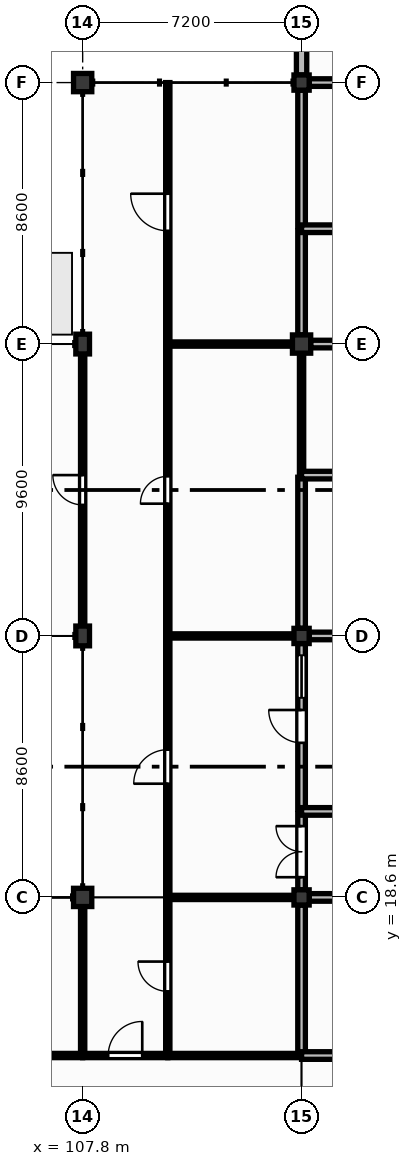
"""IFC4 building model, lengths in metres.
Left out: names, types, materials, properties, quantities, classifications, styles, units other than length and angle.
Written with IfcOpenShell. Run it as: python <this file> out.ifc"""

import sys

from ifc_helpers import new_model, si_unit, direction, frame, frame_2d, origin, origin_2d, place, context, subcontext, project, spatial, rectangle, extrude, element, fill, save


model = new_model("IFC4")
c1 = context("Model", 3, precision=1e-05, world=origin(), true_north=direction((0.0, 1.0)))
c2 = subcontext(c1, "Body", "Model", "MODEL_VIEW")
j1 = project(units=[si_unit("LENGTHUNIT", "METRE"), si_unit("PLANEANGLEUNIT", "RADIAN")], contexts=[c1])
p1 = place(None, origin())
s1 = spatial("IfcSite", under=j1, at=p1, CompositionType="ELEMENT")
p2 = place(p1, origin())
s2 = spatial("IfcBuilding", under=s1, at=p2, CompositionType="ELEMENT")
p3 = place(p2, origin())
s3 = spatial("IfcBuildingStorey", under=s2, at=p3, CompositionType="ELEMENT", Elevation=0.0)
p4 = place(p3, frame((107.8, 18.6, 0.0), z_axis=(0.0, 0.0, 1.0), x_axis=(1.0, 0.0, 0.0)))
e1 = element("IfcColumn", 1, at=p4, inside=s3, PredefinedType="COLUMN", context=c2, shape_type="SweptSolid", body=[
    extrude(rectangle(XDim=0.6, YDim=0.6, at=origin_2d()), origin(), (0.0, 0.0, 1.0), 4.2),
])
for number, where, z_axis, x_axis in (
    (2, (107.8, 27.2, 0.0), (0.0, 0.0, 1.0), (1.0, 0.0, 0.0)),
    (3, (107.8, 36.8, 0.0), (0.0, 0.0, 1.0), (1.0, 0.0, 0.0)),
):
    element("IfcColumn", number, at=place(p3, frame(where, z_axis=z_axis, x_axis=x_axis)), inside=s3, PredefinedType="COLUMN", context=c2, shape_type="SweptSolid", body=[
        extrude(rectangle(XDim=0.45, YDim=0.65, at=origin_2d()), origin(), (0.0, 0.0, 1.0), 4.2),
    ])
p5 = place(p3, frame((107.8, 45.4, 0.0), z_axis=(0.0, 0.0, 1.0), x_axis=(1.0, 0.0, 0.0)))
e4 = element("IfcColumn", 4, at=p5, inside=s3, PredefinedType="COLUMN", context=c2, shape_type="SweptSolid", body=[
    extrude(rectangle(XDim=0.6, YDim=0.6, at=origin_2d()), origin(), (0.0, 0.0, 1.0), 4.2),
])
for number, where, z_axis, x_axis in (
    (5, (115.0, 18.6, 0.0), (0.0, 0.0, 1.0), (1.0, 0.0, 0.0)),
    (6, (115.0, 27.2, 0.0), (0.0, 0.0, 1.0), (1.0, 0.0, 0.0)),
):
    element("IfcColumn", number, at=place(p3, frame(where, z_axis=z_axis, x_axis=x_axis)), inside=s3, PredefinedType="COLUMN", context=c2, shape_type="SweptSolid", body=[
        extrude(rectangle(XDim=0.5, YDim=0.5, at=origin_2d()), origin(), (0.0, 0.0, 1.0), 4.2),
    ])
p6 = place(p3, frame((115.0, 36.8, 0.0), z_axis=(0.0, 0.0, 1.0), x_axis=(1.0, 0.0, 0.0)))
e7 = element("IfcColumn", 7, at=p6, inside=s3, PredefinedType="COLUMN", context=c2, shape_type="SweptSolid", body=[
    extrude(rectangle(XDim=0.6, YDim=0.6, at=origin_2d()), origin(), (0.0, 0.0, 1.0), 4.2),
])
p7 = place(p3, frame((115.0, 45.4, 0.0), z_axis=(0.0, 0.0, 1.0), x_axis=(1.0, 0.0, 0.0)))
e8 = element("IfcColumn", 8, at=p7, inside=s3, PredefinedType="COLUMN", context=c2, shape_type="SweptSolid", body=[
    extrude(rectangle(XDim=0.5, YDim=0.5, at=origin_2d()), origin(), (0.0, 0.0, 1.0), 4.2),
])
p8 = place(p3, frame((115.0, 45.65, 0.0), z_axis=(0.0, 0.0, 1.0), x_axis=(0.0, 1.0, 0.0)))
e9 = element("IfcWall", 9, at=p8, inside=s3, PredefinedType="SOLIDWALL", context=c2, shape_type="SweptSolid", body=[
    extrude(rectangle(XDim=6.7, YDim=0.34, at=frame_2d((3.35, 0.0))), origin(), (0.0, 0.0, 1.0), 3.68),
])
p9 = place(p8, frame((0.881, 0.0, 1.0)))
e10 = element("IfcOpeningElement", 10, at=p9, cuts=e9, PredefinedType="OPENING", context=c2, shape_type="SweptSolid", body=[
    extrude(rectangle(XDim=1.34, YDim=1.95, at=frame_2d((0.67, 0.975))), frame((0.0, 0.18, 0.0), z_axis=(0.0, -1.0, 0.0), x_axis=(1.0, 0.0, 0.0)), (0.0, 0.0, 1.0), 0.36),
])
p10 = place(p8, frame((4.231, 0.0, 1.0)))
e11 = element("IfcOpeningElement", 11, at=p10, cuts=e9, PredefinedType="OPENING", context=c2, shape_type="SweptSolid", body=[
    extrude(rectangle(XDim=1.1, YDim=2.2, at=frame_2d((0.55, 1.1))), frame((0.0, 0.18, 0.0), z_axis=(0.0, -1.0, 0.0), x_axis=(1.0, 0.0, 0.0)), (0.0, 0.0, 1.0), 0.36),
])
p11 = place(p3, frame((100.6, 13.4, 0.0), z_axis=(0.0, 0.0, 1.0), x_axis=(1.0, 0.0, 0.0)))
e12 = element("IfcWall", 12, at=p11, inside=s3, PredefinedType="PARTITIONING", context=c2, shape_type="SweptSolid", body=[
    extrude(rectangle(XDim=7.2, YDim=0.14, at=frame_2d((3.6, 0.0))), origin(), (0.0, 0.0, 1.0), 4.18),
])
p12 = place(p11, frame((2.99, 0.0, 0.0)))
e13 = element("IfcOpeningElement", 13, at=p12, cuts=e12, PredefinedType="OPENING", context=c2, shape_type="SweptSolid", body=[
    extrude(rectangle(XDim=1.22, YDim=2.1, at=frame_2d((0.61, 1.05))), frame((0.0, 0.08, 0.0), z_axis=(0.0, -1.0, 0.0), x_axis=(1.0, 0.0, 0.0)), (0.0, 0.0, 1.0), 0.16),
])
p13 = place(p3, frame((107.8, 13.47, 0.0), z_axis=(0.0, 0.0, 1.0), x_axis=(0.0, 1.0, 0.0)))
e14 = element("IfcWall", 14, at=p13, inside=s3, PredefinedType="PARTITIONING", context=c2, shape_type="SweptSolid", body=[
    extrude(rectangle(XDim=4.83, YDim=0.14, at=frame_2d((2.415, 0.0))), origin(), (0.0, 0.0, 1.0), 3.5),
])
p14 = place(p3, frame((107.8, 13.4, 0.0), z_axis=(0.0, 0.0, 1.0), x_axis=(1.0, 0.0, 0.0)))
e15 = element("IfcWall", 15, at=p14, inside=s3, PredefinedType="PARTITIONING", context=c2, shape_type="SweptSolid", body=[
    extrude(rectangle(XDim=2.8, YDim=0.14, at=frame_2d((1.4, 0.0))), origin(), (0.0, 0.0, 1.0), 4.18),
])
p15 = place(p14, frame((0.84, 0.0, 0.0)))
e16 = element("IfcOpeningElement", 16, at=p15, cuts=e15, PredefinedType="OPENING", context=c2, shape_type="SweptSolid", body=[
    extrude(rectangle(XDim=1.12, YDim=2.15, at=frame_2d((0.56, 1.075))), frame((0.0, 0.08, 0.0), z_axis=(0.0, -1.0, 0.0), x_axis=(1.0, 0.0, 0.0)), (0.0, 0.0, 1.0), 0.16),
])
p16 = place(p3, frame((107.8, 27.525, 0.0), z_axis=(0.0, 0.0, 1.0), x_axis=(0.0, 1.0, 0.0)))
e17 = element("IfcWall", 17, at=p16, inside=s3, PredefinedType="PARTITIONING", context=c2, shape_type="SweptSolid", body=[
    extrude(rectangle(XDim=8.95, YDim=0.14, at=frame_2d((4.475, 0.0))), origin(), (0.0, 0.0, 1.0), 3.4),
])
p17 = place(p16, frame((3.985, 0.0, 0.0)))
e18 = element("IfcOpeningElement", 18, at=p17, cuts=e17, PredefinedType="OPENING", context=c2, shape_type="SweptSolid", body=[
    extrude(rectangle(XDim=0.98, YDim=2.15, at=frame_2d((0.49, 1.075))), frame((0.0, 0.08, 0.0), z_axis=(0.0, -1.0, 0.0), x_axis=(1.0, 0.0, 0.0)), (0.0, 0.0, 1.0), 0.16),
])
p18 = place(p3, frame((110.6, 13.47, 0.0), z_axis=(0.0, 0.0, 1.0), x_axis=(0.0, 1.0, 0.0)))
e19 = element("IfcWall", 19, at=p18, inside=s3, PredefinedType="PARTITIONING", context=c2, shape_type="SweptSolid", body=[
    extrude(rectangle(XDim=5.06, YDim=0.14, at=frame_2d((2.53, 0.0))), origin(), (0.0, 0.0, 1.0), 4.18),
])
p19 = place(p18, frame((2.04, 0.0, 0.0)))
e20 = element("IfcOpeningElement", 20, at=p19, cuts=e19, PredefinedType="OPENING", context=c2, shape_type="SweptSolid", body=[
    extrude(rectangle(XDim=0.98, YDim=2.15, at=frame_2d((0.49, 1.075))), frame((0.0, 0.08, 0.0), z_axis=(0.0, -1.0, 0.0), x_axis=(1.0, 0.0, 0.0)), (0.0, 0.0, 1.0), 0.16),
])
p20 = place(p3, frame((110.6, 13.4, 0.0), z_axis=(0.0, 0.0, 1.0), x_axis=(1.0, 0.0, 0.0)))
e21 = element("IfcWall", 21, at=p20, inside=s3, PredefinedType="PARTITIONING", context=c2, shape_type="SweptSolid", body=[
    extrude(rectangle(XDim=4.4, YDim=0.14, at=frame_2d((2.2, 0.0))), origin(), (0.0, 0.0, 1.0), 4.18),
])
p21 = place(p3, frame((110.6, 18.67, 0.0), z_axis=(0.0, 0.0, 1.0), x_axis=(0.0, 1.0, 0.0)))
e22 = element("IfcWall", 22, at=p21, inside=s3, PredefinedType="PARTITIONING", context=c2, shape_type="SweptSolid", body=[
    extrude(rectangle(XDim=8.46, YDim=0.14, at=frame_2d((4.23, 0.0))), origin(), (0.0, 0.0, 1.0), 4.18),
])
p22 = place(p21, frame((3.67, 0.0, 0.0)))
e23 = element("IfcOpeningElement", 23, at=p22, cuts=e22, PredefinedType="OPENING", context=c2, shape_type="SweptSolid", body=[
    extrude(rectangle(XDim=1.12, YDim=2.15, at=frame_2d((0.56, 1.075))), frame((0.0, 0.08, 0.0), z_axis=(0.0, -1.0, 0.0), x_axis=(1.0, 0.0, 0.0)), (0.0, 0.0, 1.0), 0.16),
])
p23 = place(p3, frame((110.6, 18.6, 0.0), z_axis=(0.0, 0.0, 1.0), x_axis=(1.0, 0.0, 0.0)))
e24 = element("IfcWall", 24, at=p23, inside=s3, PredefinedType="PARTITIONING", context=c2, shape_type="SweptSolid", body=[
    extrude(rectangle(XDim=4.15, YDim=0.14, at=frame_2d((2.075, 0.0))), origin(), (0.0, 0.0, 1.0), 3.25),
])
p24 = place(p3, frame((110.6, 27.27, 0.0), z_axis=(0.0, 0.0, 1.0), x_axis=(0.0, 1.0, 0.0)))
e25 = element("IfcWall", 25, at=p24, inside=s3, PredefinedType="PARTITIONING", context=c2, shape_type="SweptSolid", body=[
    extrude(rectangle(XDim=9.46, YDim=0.14, at=frame_2d((4.73, 0.0))), origin(), (0.0, 0.0, 1.0), 4.18),
])
p25 = place(p24, frame((4.28, 0.0, 0.0)))
e26 = element("IfcOpeningElement", 26, at=p25, cuts=e25, PredefinedType="OPENING", context=c2, shape_type="SweptSolid", body=[
    extrude(rectangle(XDim=0.9, YDim=2.1, at=frame_2d((0.45, 1.05))), frame((0.0, 0.08, 0.0), z_axis=(0.0, -1.0, 0.0), x_axis=(1.0, 0.0, 0.0)), (0.0, 0.0, 1.0), 0.16),
])
p26 = place(p3, frame((110.6, 27.2, 0.0), z_axis=(0.0, 0.0, 1.0), x_axis=(1.0, 0.0, 0.0)))
e27 = element("IfcWall", 27, at=p26, inside=s3, PredefinedType="PARTITIONING", context=c2, shape_type="SweptSolid", body=[
    extrude(rectangle(XDim=4.15, YDim=0.14, at=frame_2d((2.075, 0.0))), origin(), (0.0, 0.0, 1.0), 3.6),
])
p27 = place(p3, frame((110.6, 36.87, 0.0), z_axis=(0.0, 0.0, 1.0), x_axis=(0.0, 1.0, 0.0)))
e28 = element("IfcWall", 28, at=p27, inside=s3, PredefinedType="PARTITIONING", context=c2, shape_type="SweptSolid", body=[
    extrude(rectangle(XDim=8.53, YDim=0.14, at=frame_2d((4.265, 0.0))), origin(), (0.0, 0.0, 1.0), 4.18),
])
p28 = place(p27, frame((3.655, 0.0, 0.0)))
e29 = element("IfcOpeningElement", 29, at=p28, cuts=e28, PredefinedType="OPENING", context=c2, shape_type="SweptSolid", body=[
    extrude(rectangle(XDim=1.22, YDim=2.1, at=frame_2d((0.61, 1.05))), frame((0.0, 0.08, 0.0), z_axis=(0.0, -1.0, 0.0), x_axis=(1.0, 0.0, 0.0)), (0.0, 0.0, 1.0), 0.16),
])
p29 = place(p3, frame((110.6, 36.8, 0.0), z_axis=(0.0, 0.0, 1.0), x_axis=(1.0, 0.0, 0.0)))
e30 = element("IfcWall", 30, at=p29, inside=s3, PredefinedType="PARTITIONING", context=c2, shape_type="SweptSolid", body=[
    extrude(rectangle(XDim=4.1, YDim=0.14, at=frame_2d((2.05, 0.0))), origin(), (0.0, 0.0, 1.0), 3.5),
])
p30 = place(p3, frame((115.0, 13.47, 0.0), z_axis=(0.0, 0.0, 1.0), x_axis=(0.0, 1.0, 0.0)))
e31 = element("IfcWall", 31, at=p30, inside=s3, PredefinedType="SOLIDWALL", context=c2, shape_type="SweptSolid", body=[
    extrude(rectangle(XDim=4.88, YDim=0.25, at=frame_2d((2.44, 0.0))), origin(), (0.0, 0.0, 1.0), 3.5),
])
p31 = place(p3, frame((115.0, 13.4, 0.0), z_axis=(0.0, 0.0, 1.0), x_axis=(1.0, 0.0, 0.0)))
e32 = element("IfcWall", 32, at=p31, inside=s3, PredefinedType="SOLIDWALL", context=c2, shape_type="SweptSolid", body=[
    extrude(rectangle(XDim=6.8, YDim=0.25, at=frame_2d((3.4, 0.0))), origin(), (0.0, 0.0, 1.0), 4.18),
])
p32 = place(p31, frame((2.86, 0.0, 0.0)))
e33 = element("IfcOpeningElement", 33, at=p32, cuts=e32, PredefinedType="OPENING", context=c2, shape_type="SweptSolid", body=[
    extrude(rectangle(XDim=1.08, YDim=2.15, at=frame_2d((0.54, 1.075))), frame((0.0, 0.135, 0.0), z_axis=(0.0, -1.0, 0.0), x_axis=(1.0, 0.0, 0.0)), (0.0, 0.0, 1.0), 0.27),
])
p33 = place(p31, frame((4.34, 0.0, 1.05)))
e34 = element("IfcOpeningElement", 34, at=p33, cuts=e32, PredefinedType="OPENING", context=c2, shape_type="SweptSolid", body=[
    extrude(rectangle(XDim=1.2, YDim=1.1, at=frame_2d((0.6, 0.55))), frame((0.0, 0.135, 0.0), z_axis=(0.0, -1.0, 0.0), x_axis=(1.0, 0.0, 0.0)), (0.0, 0.0, 1.0), 0.27),
])
p34 = place(p3, frame((115.0, 18.85, 0.0), z_axis=(0.0, 0.0, 1.0), x_axis=(0.0, 1.0, 0.0)))
e35 = element("IfcWall", 35, at=p34, inside=s3, PredefinedType="SOLIDWALL", context=c2, shape_type="SweptSolid", body=[
    extrude(rectangle(XDim=2.509, YDim=0.25, at=frame_2d((1.254, 0.0))), origin(), (0.0, 0.0, 1.0), 3.4),
])
p35 = place(p34, frame((0.415, 0.0, 0.0)))
e36 = element("IfcOpeningElement", 36, at=p35, cuts=e35, PredefinedType="OPENING", context=c2, shape_type="SweptSolid", body=[
    extrude(rectangle(XDim=1.68, YDim=2.3, at=frame_2d((0.84, 1.15))), frame((0.0, 0.135, 0.0), z_axis=(0.0, -1.0, 0.0), x_axis=(1.0, 0.0, 0.0)), (0.0, 0.0, 1.0), 0.27),
])
p36 = place(p3, frame((115.25, 18.6, 0.0), z_axis=(0.0, 0.0, 1.0), x_axis=(1.0, 0.0, 0.0)))
e37 = element("IfcWall", 37, at=p36, inside=s3, PredefinedType="SOLIDWALL", context=c2, shape_type="SweptSolid", body=[
    extrude(rectangle(XDim=6.55, YDim=0.25, at=frame_2d((3.275, 0.0))), origin(), (0.0, 0.0, 1.0), 3.25),
])
p37 = place(p3, frame((115.0, 21.499, 0.0), z_axis=(0.0, 0.0, 1.0), x_axis=(0.0, 1.0, 0.0)))
e38 = element("IfcWall", 38, at=p37, inside=s3, PredefinedType="SOLIDWALL", context=c2, shape_type="SweptSolid", body=[
    extrude(rectangle(XDim=5.451, YDim=0.25, at=frame_2d((2.726, 0.0))), origin(), (0.0, 0.0, 1.0), 3.4),
])
p38 = place(p37, frame((2.186, 0.0, 0.0)))
e39 = element("IfcOpeningElement", 39, at=p38, cuts=e38, PredefinedType="OPENING", context=c2, shape_type="SweptSolid", body=[
    extrude(rectangle(XDim=1.08, YDim=2.15, at=frame_2d((0.54, 1.075))), frame((0.0, 0.135, 0.0), z_axis=(0.0, -1.0, 0.0), x_axis=(1.0, 0.0, 0.0)), (0.0, 0.0, 1.0), 0.27),
])
p39 = place(p37, frame((3.666, 0.0, 1.05)))
e40 = element("IfcOpeningElement", 40, at=p39, cuts=e38, PredefinedType="OPENING", context=c2, shape_type="SweptSolid", body=[
    extrude(rectangle(XDim=1.4, YDim=1.1, at=frame_2d((0.7, 0.55))), frame((0.0, 0.135, 0.0), z_axis=(0.0, -1.0, 0.0), x_axis=(1.0, 0.0, 0.0)), (0.0, 0.0, 1.0), 0.27),
])
p40 = place(p3, frame((115.0, 21.429, 0.0), z_axis=(0.0, 0.0, 1.0), x_axis=(1.0, 0.0, 0.0)))
e41 = element("IfcWall", 41, at=p40, inside=s3, PredefinedType="SOLIDWALL", context=c2, shape_type="SweptSolid", body=[
    extrude(rectangle(XDim=6.8, YDim=0.25, at=frame_2d((3.4, 0.0))), origin(), (0.0, 0.0, 1.0), 4.18),
])
p41 = place(p3, frame((115.0, 27.45, 0.0), z_axis=(0.0, 0.0, 1.0), x_axis=(0.0, 1.0, 0.0)))
e42 = element("IfcWall", 42, at=p41, inside=s3, PredefinedType="SOLIDWALL", context=c2, shape_type="SweptSolid", body=[
    extrude(rectangle(XDim=4.97, YDim=0.25, at=frame_2d((2.485, 0.0))), origin(), (0.0, 0.0, 1.0), 3.4),
])
p42 = place(p3, frame((115.25, 27.2, 0.0), z_axis=(0.0, 0.0, 1.0), x_axis=(1.0, 0.0, 0.0)))
e43 = element("IfcWall", 43, at=p42, inside=s3, PredefinedType="SOLIDWALL", context=c2, shape_type="SweptSolid", body=[
    extrude(rectangle(XDim=6.55, YDim=0.25, at=frame_2d((3.275, 0.0))), origin(), (0.0, 0.0, 1.0), 3.6),
])
p43 = place(p3, frame((115.0, 32.56, 0.0), z_axis=(0.0, 0.0, 1.0), x_axis=(0.0, 1.0, 0.0)))
e44 = element("IfcWall", 44, at=p43, inside=s3, PredefinedType="PARTITIONING", context=c2, shape_type="SweptSolid", body=[
    extrude(rectangle(XDim=3.94, YDim=0.14, at=frame_2d((1.97, 0.0))), origin(), (0.0, 0.0, 1.0), 3.4),
])
p44 = place(p3, frame((115.0, 32.49, 0.0), z_axis=(0.0, 0.0, 1.0), x_axis=(1.0, 0.0, 0.0)))
e45 = element("IfcWall", 45, at=p44, inside=s3, PredefinedType="SOLIDWALL", context=c2, shape_type="SweptSolid", body=[
    extrude(rectangle(XDim=6.8, YDim=0.25, at=frame_2d((3.4, 0.0))), origin(), (0.0, 0.0, 1.0), 4.18),
])
p45 = place(p3, frame((115.0, 37.1, 0.0), z_axis=(0.0, 0.0, 1.0), x_axis=(0.0, 1.0, 0.0)))
e46 = element("IfcWall", 46, at=p45, inside=s3, PredefinedType="SOLIDWALL", context=c2, shape_type="SweptSolid", body=[
    extrude(rectangle(XDim=3.423, YDim=0.25, at=frame_2d((1.711, 0.0))), origin(), (0.0, 0.0, 1.0), 3.4),
])
p46 = place(p3, frame((115.3, 36.8, 0.0), z_axis=(0.0, 0.0, 1.0), x_axis=(1.0, 0.0, 0.0)))
e47 = element("IfcWall", 47, at=p46, inside=s3, PredefinedType="SOLIDWALL", context=c2, shape_type="SweptSolid", body=[
    extrude(rectangle(XDim=6.5, YDim=0.25, at=frame_2d((3.25, 0.0))), origin(), (0.0, 0.0, 1.0), 3.5),
])
p47 = place(p3, frame((115.0, 40.663, 0.0), z_axis=(0.0, 0.0, 1.0), x_axis=(0.0, 1.0, 0.0)))
e48 = element("IfcWall", 48, at=p47, inside=s3, PredefinedType="SOLIDWALL", context=c2, shape_type="SweptSolid", body=[
    extrude(rectangle(XDim=4.487, YDim=0.25, at=frame_2d((2.243, 0.0))), origin(), (0.0, 0.0, 1.0), 3.4),
])
p48 = place(p3, frame((115.0, 40.593, 0.0), z_axis=(0.0, 0.0, 1.0), x_axis=(1.0, 0.0, 0.0)))
e49 = element("IfcWall", 49, at=p48, inside=s3, PredefinedType="SOLIDWALL", context=c2, shape_type="SweptSolid", body=[
    extrude(rectangle(XDim=6.8, YDim=0.25, at=frame_2d((3.4, 0.0))), origin(), (0.0, 0.0, 1.0), 4.18),
])
p49 = place(p3, frame((115.25, 45.4, 0.0), z_axis=(0.0, 0.0, 1.0), x_axis=(1.0, 0.0, 0.0)))
e50 = element("IfcWall", 50, at=p49, inside=s3, PredefinedType="SOLIDWALL", context=c2, shape_type="SweptSolid", body=[
    extrude(rectangle(XDim=6.55, YDim=0.25, at=frame_2d((3.275, 0.0))), origin(), (0.0, 0.0, 1.0), 3.25),
])
p50 = place(p15, origin())
e51 = element("IfcDoor", 51, at=p50, inside=s3, OperationType="SINGLE_SWING_RIGHT", PredefinedType="DOOR", context=c2, shape_type="SweptSolid", body=[
    extrude(rectangle(XDim=1.12, YDim=2.15, at=frame_2d((0.56, 1.075))), frame((0.0, 0.025, 0.0), z_axis=(0.0, -1.0, 0.0), x_axis=(1.0, 0.0, 0.0)), (0.0, 0.0, 1.0), 0.05),
])
fill(e16, e51)
p51 = place(p17, origin())
e52 = element("IfcDoor", 52, at=p51, inside=s3, OperationType="SINGLE_SWING_RIGHT", PredefinedType="DOOR", context=c2, shape_type="SweptSolid", body=[
    extrude(rectangle(XDim=0.98, YDim=2.15, at=frame_2d((0.49, 1.075))), frame((0.0, 0.025, 0.0), z_axis=(0.0, -1.0, 0.0), x_axis=(1.0, 0.0, 0.0)), (0.0, 0.0, 1.0), 0.05),
])
fill(e18, e52)
p52 = place(p22, origin())
e53 = element("IfcDoor", 53, at=p52, inside=s3, OperationType="SINGLE_SWING_LEFT", PredefinedType="DOOR", context=c2, shape_type="SweptSolid", body=[
    extrude(rectangle(XDim=1.12, YDim=2.15, at=frame_2d((0.56, 1.075))), frame((0.0, 0.025, 0.0), z_axis=(0.0, -1.0, 0.0), x_axis=(1.0, 0.0, 0.0)), (0.0, 0.0, 1.0), 0.05),
])
fill(e23, e53)
p53 = place(p25, origin())
e54 = element("IfcDoor", 54, at=p53, inside=s3, OperationType="SINGLE_SWING_LEFT", PredefinedType="DOOR", context=c2, shape_type="SweptSolid", body=[
    extrude(rectangle(XDim=0.9, YDim=2.1, at=frame_2d((0.45, 1.05))), frame((0.0, 0.025, 0.0), z_axis=(0.0, -1.0, 0.0), x_axis=(1.0, 0.0, 0.0)), (0.0, 0.0, 1.0), 0.05),
])
fill(e26, e54)
p54 = place(p28, origin())
e55 = element("IfcDoor", 55, at=p54, inside=s3, OperationType="SINGLE_SWING_RIGHT", PredefinedType="DOOR", context=c2, shape_type="SweptSolid", body=[
    extrude(rectangle(XDim=1.22, YDim=2.1, at=frame_2d((0.61, 1.05))), frame((0.0, 0.025, 0.0), z_axis=(0.0, -1.0, 0.0), x_axis=(1.0, 0.0, 0.0)), (0.0, 0.0, 1.0), 0.05),
])
fill(e29, e55)
p55 = place(p19, origin())
e56 = element("IfcDoor", 56, at=p55, inside=s3, OperationType="SINGLE_SWING_RIGHT", PredefinedType="DOOR", context=c2, shape_type="SweptSolid", body=[
    extrude(rectangle(XDim=0.98, YDim=2.15, at=frame_2d((0.49, 1.075))), frame((0.0, 0.025, 0.0), z_axis=(0.0, -1.0, 0.0), x_axis=(1.0, 0.0, 0.0)), (0.0, 0.0, 1.0), 0.05),
])
fill(e20, e56)
p56 = place(p35, origin())
e57 = element("IfcDoor", 57, at=p56, inside=s3, OperationType="DOUBLE_DOOR_SINGLE_SWING", PredefinedType="DOOR", context=c2, shape_type="SweptSolid", body=[
    extrude(rectangle(XDim=1.68, YDim=2.3, at=frame_2d((0.84, 1.15))), frame((0.0, 0.025, 0.0), z_axis=(0.0, -1.0, 0.0), x_axis=(1.0, 0.0, 0.0)), (0.0, 0.0, 1.0), 0.05),
])
fill(e36, e57)
p57 = place(p38, origin())
e58 = element("IfcDoor", 58, at=p57, inside=s3, OperationType="SINGLE_SWING_RIGHT", PredefinedType="DOOR", context=c2, shape_type="SweptSolid", body=[
    extrude(rectangle(XDim=1.08, YDim=2.15, at=frame_2d((0.54, 1.075))), frame((0.0, 0.025, 0.0), z_axis=(0.0, -1.0, 0.0), x_axis=(1.0, 0.0, 0.0)), (0.0, 0.0, 1.0), 0.05),
])
fill(e39, e58)
p58 = place(p39, origin())
e59 = element("IfcWindow", 59, at=p58, inside=s3, PartitioningType="SINGLE_PANEL", PredefinedType="WINDOW", context=c2, shape_type="SweptSolid", body=[
    extrude(rectangle(XDim=1.4, YDim=1.1, at=frame_2d((0.7, 0.55))), frame((0.0, 0.03, 0.0), z_axis=(0.0, -1.0, 0.0), x_axis=(1.0, 0.0, 0.0)), (0.0, 0.0, 1.0), 0.06),
])
fill(e40, e59)
save(model, sys.argv[1])
